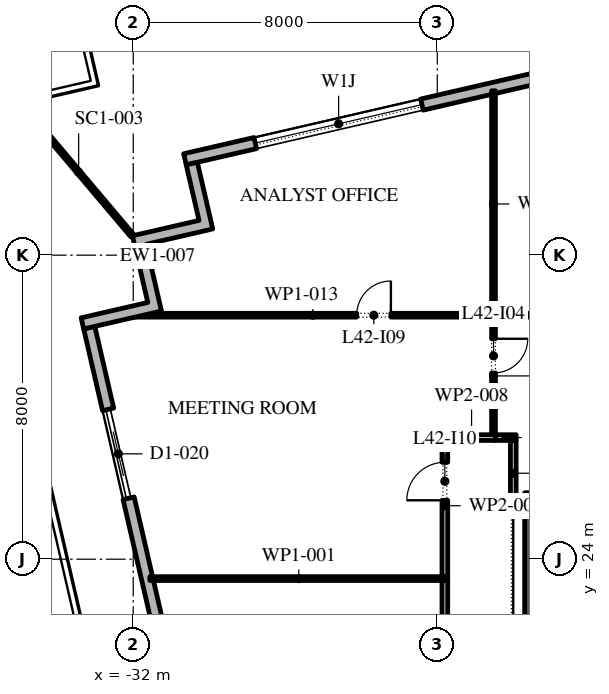
"""IFC4 building model, lengths in metres.
Left out: names, types, materials, properties, quantities, classifications, styles, units other than length and angle.
Written with IfcOpenShell. Run it as: python <this file> out.ifc"""

import sys

from ifc_helpers import new_model, si_unit, direction, frame, frame_2d, origin, place, context, subcontext, project, spatial, polyline, rectangle, outline, extrude, element, fill, save


model = new_model("IFC4")
c1 = context("Model", 3, precision=1e-05, world=origin(), true_north=direction((0.0, 1.0)))
c2 = subcontext(c1, "Body", "Model", "MODEL_VIEW")
j1 = project(units=[si_unit("LENGTHUNIT", "METRE"), si_unit("PLANEANGLEUNIT", "RADIAN")], contexts=[c1])
p1 = place(None, origin())
s1 = spatial("IfcSite", under=j1, at=p1, CompositionType="ELEMENT")
p2 = place(p1, origin())
s2 = spatial("IfcBuilding", under=s1, at=p2, CompositionType="ELEMENT")
p3 = place(p2, frame((0.0, 0.0, 192.6)))
s3 = spatial("IfcBuildingStorey", under=s2, at=p3, CompositionType="ELEMENT", Elevation=192.6)
p4 = place(p3, frame((17.592, 45.657, 0.0), z_axis=(0.0, 0.0, 1.0), x_axis=(-0.974370243697, -0.224950279389, 0.0)))
e1 = element("IfcWall", 1, at=p4, inside=s3, PredefinedType="STANDARD", context=c2, shape_type="SweptSolid", body=[
    extrude(rectangle(XDim=49.5, YDim=0.3, at=frame_2d((24.75, 0.0))), origin(), (0.0, 0.0, 1.0), 4.0),
])
p5 = place(p4, frame((2.8, 0.0, 0.0)))
e2 = element("IfcOpeningElement", 2, at=p5, cuts=e1, PredefinedType="OPENING", context=c2, shape_type="SweptSolid", body=[
    extrude(rectangle(XDim=2.4, YDim=3.5, at=frame_2d((1.2, 1.75))), frame((0.0, 0.16, 0.0), z_axis=(0.0, -1.0, 0.0), x_axis=(1.0, 0.0, 0.0)), (0.0, 0.0, 1.0), 0.32),
])
p6 = place(p4, frame((9.9, 0.0, 0.45)))
e3 = element("IfcOpeningElement", 3, at=p6, cuts=e1, PredefinedType="OPENING", context=c2, shape_type="SweptSolid", body=[
    extrude(rectangle(XDim=4.5, YDim=2.45, at=frame_2d((2.25, 1.225))), frame((0.0, 0.16, 0.0), z_axis=(0.0, -1.0, 0.0), x_axis=(1.0, 0.0, 0.0)), (0.0, 0.0, 1.0), 0.32),
])
p7 = place(p4, frame((18.2, 0.0, 0.45)))
e4 = element("IfcOpeningElement", 4, at=p7, cuts=e1, PredefinedType="OPENING", context=c2, shape_type="SweptSolid", body=[
    extrude(rectangle(XDim=4.5, YDim=2.45, at=frame_2d((2.25, 1.225))), frame((0.0, 0.16, 0.0), z_axis=(0.0, -1.0, 0.0), x_axis=(1.0, 0.0, 0.0)), (0.0, 0.0, 1.0), 0.32),
])
p8 = place(p4, frame((26.5, 0.0, 0.45)))
e5 = element("IfcOpeningElement", 5, at=p8, cuts=e1, PredefinedType="OPENING", context=c2, shape_type="SweptSolid", body=[
    extrude(rectangle(XDim=4.5, YDim=2.525, at=frame_2d((2.25, 1.262))), frame((0.0, 0.16, 0.0), z_axis=(0.0, -1.0, 0.0), x_axis=(1.0, 0.0, 0.0)), (0.0, 0.0, 1.0), 0.32),
])
p9 = place(p4, frame((35.85, 0.0, 0.0)))
e6 = element("IfcOpeningElement", 6, at=p9, cuts=e1, PredefinedType="OPENING", context=c2, shape_type="SweptSolid", body=[
    extrude(rectangle(XDim=2.4, YDim=3.5, at=frame_2d((1.2, 1.75))), frame((0.0, 0.16, 0.0), z_axis=(0.0, -1.0, 0.0), x_axis=(1.0, 0.0, 0.0)), (0.0, 0.0, 1.0), 0.32),
])
p10 = place(p4, frame((43.1, 0.0, 0.45)))
e7 = element("IfcOpeningElement", 7, at=p10, cuts=e1, PredefinedType="OPENING", context=c2, shape_type="SweptSolid", body=[
    extrude(rectangle(XDim=4.5, YDim=2.675, at=frame_2d((2.25, 1.337))), frame((0.0, 0.16, 0.0), z_axis=(0.0, -1.0, 0.0), x_axis=(1.0, 0.0, 0.0)), (0.0, 0.0, 1.0), 0.32),
])
p11 = place(p3, frame((-33.157, 30.092, 0.0), z_axis=(0.0, 0.0, 1.0), x_axis=(0.224950279389, -0.974370243697, 0.0)))
e8 = element("IfcWall", 8, at=p11, inside=s3, PredefinedType="STANDARD", context=c2, shape_type="SweptSolid", body=[
    extrude(rectangle(XDim=49.5, YDim=0.3, at=frame_2d((24.75, 0.0))), origin(), (0.0, 0.0, 1.0), 4.0),
])
p12 = place(p11, frame((2.207, 0.0, 0.0)))
e9 = element("IfcOpeningElement", 9, at=p12, cuts=e8, PredefinedType="OPENING", context=c2, shape_type="SweptSolid", body=[
    extrude(rectangle(XDim=2.4, YDim=3.5, at=frame_2d((1.2, 1.75))), frame((0.0, 0.16, 0.0), z_axis=(0.0, -1.0, 0.0), x_axis=(1.0, 0.0, 0.0)), (0.0, 0.0, 1.0), 0.32),
])
p13 = place(p11, frame((8.121, 0.0, 0.45)))
e10 = element("IfcOpeningElement", 10, at=p13, cuts=e8, PredefinedType="OPENING", context=c2, shape_type="SweptSolid", body=[
    extrude(rectangle(XDim=4.5, YDim=2.825, at=frame_2d((2.25, 1.413))), frame((0.0, 0.16, 0.0), z_axis=(0.0, -1.0, 0.0), x_axis=(1.0, 0.0, 0.0)), (0.0, 0.0, 1.0), 0.32),
])
p14 = place(p11, frame((15.236, 0.0, 0.45)))
e11 = element("IfcOpeningElement", 11, at=p14, cuts=e8, PredefinedType="OPENING", context=c2, shape_type="SweptSolid", body=[
    extrude(rectangle(XDim=4.5, YDim=2.95, at=frame_2d((2.25, 1.475))), frame((0.0, 0.16, 0.0), z_axis=(0.0, -1.0, 0.0), x_axis=(1.0, 0.0, 0.0)), (0.0, 0.0, 1.0), 0.32),
])
p15 = place(p11, frame((22.35, 0.0, 0.45)))
e12 = element("IfcOpeningElement", 12, at=p15, cuts=e8, PredefinedType="OPENING", context=c2, shape_type="SweptSolid", body=[
    extrude(rectangle(XDim=4.5, YDim=3.0, at=frame_2d((2.25, 1.5))), frame((0.0, 0.16, 0.0), z_axis=(0.0, -1.0, 0.0), x_axis=(1.0, 0.0, 0.0)), (0.0, 0.0, 1.0), 0.32),
])
p16 = place(p11, frame((30.514, 0.0, 0.0)))
e13 = element("IfcOpeningElement", 13, at=p16, cuts=e8, PredefinedType="OPENING", context=c2, shape_type="SweptSolid", body=[
    extrude(rectangle(XDim=2.4, YDim=3.5, at=frame_2d((1.2, 1.75))), frame((0.0, 0.16, 0.0), z_axis=(0.0, -1.0, 0.0), x_axis=(1.0, 0.0, 0.0)), (0.0, 0.0, 1.0), 0.32),
])
p17 = place(p11, frame((36.579, 0.0, 0.45)))
e14 = element("IfcOpeningElement", 14, at=p17, cuts=e8, PredefinedType="OPENING", context=c2, shape_type="SweptSolid", body=[
    extrude(rectangle(XDim=4.5, YDim=3.05, at=frame_2d((2.25, 1.525))), frame((0.0, 0.16, 0.0), z_axis=(0.0, -1.0, 0.0), x_axis=(1.0, 0.0, 0.0)), (0.0, 0.0, 1.0), 0.32),
])
p18 = place(p11, frame((43.693, 0.0, 0.45)))
e15 = element("IfcOpeningElement", 15, at=p18, cuts=e8, PredefinedType="OPENING", context=c2, shape_type="SweptSolid", body=[
    extrude(rectangle(XDim=4.5, YDim=3.05, at=frame_2d((2.25, 1.525))), frame((0.0, 0.16, 0.0), z_axis=(0.0, -1.0, 0.0), x_axis=(1.0, 0.0, 0.0)), (0.0, 0.0, 1.0), 0.32),
])
p19 = place(p3, origin())
e16 = element("IfcWall", 16, at=p19, inside=s3, PredefinedType="STANDARD", context=c2, shape_type="SweptSolid", body=[
    extrude(outline(polyline([(-31.617, 30.756), (-32.022, 32.51), (-30.268, 32.914), (-30.605, 34.376), (-30.313, 34.443), (-29.908, 32.69), (-31.662, 32.285), (-31.257, 30.531), (-33.303, 30.058), (-33.371, 30.351), (-31.617, 30.756)])), origin(), (0.0, 0.0, 1.0), 4.0),
])
p20 = place(p3, frame((-32.022, 32.51, -0.05), z_axis=(0.0, 0.0, 1.0), x_axis=(-0.64553496232, 0.763730719837, 0.0)))
e17 = element("IfcWall", 17, at=p20, inside=s3, PredefinedType="STANDARD", context=c2, shape_type="SweptSolid", body=[
    extrude(rectangle(XDim=4.381, YDim=0.1, at=frame_2d((2.19, 0.0))), origin(), (0.0, 0.0, 1.0), 4.05),
])
p21 = place(p3, frame((-21.35, -2.45, 0.0), z_axis=(0.0, 0.0, 1.0), x_axis=(0.0, 1.0, 0.0)))
e18 = element("IfcWall", 18, at=p21, inside=s3, PredefinedType="SHEAR", context=c2, shape_type="SweptSolid", body=[
    extrude(rectangle(XDim=27.9, YDim=0.7, at=frame_2d((13.95, 0.0))), origin(), (0.0, 0.0, 1.0), 4.0),
])
p22 = place(p21, frame((5.05, 0.0, 0.0)))
e19 = element("IfcOpeningElement", 19, at=p22, cuts=e18, PredefinedType="OPENING", context=c2, shape_type="SweptSolid", body=[
    extrude(rectangle(XDim=1.2, YDim=2.1, at=frame_2d((0.6, 1.05))), frame((0.0, 0.36, 0.0), z_axis=(0.0, -1.0, 0.0), x_axis=(1.0, 0.0, 0.0)), (0.0, 0.0, 1.0), 0.72),
])
p23 = place(p21, frame((21.65, 0.0, 0.0)))
e20 = element("IfcOpeningElement", 20, at=p23, cuts=e18, PredefinedType="OPENING", context=c2, shape_type="SweptSolid", body=[
    extrude(rectangle(XDim=1.2, YDim=2.1, at=frame_2d((0.6, 1.05))), frame((0.0, 0.36, 0.0), z_axis=(0.0, -1.0, 0.0), x_axis=(1.0, 0.0, 0.0)), (0.0, 0.0, 1.0), 0.72),
])
p24 = place(p3, frame((-21.7, 25.6, 0.0), z_axis=(0.0, 0.0, 1.0), x_axis=(1.0, 0.0, 0.0)))
e21 = element("IfcWall", 21, at=p24, inside=s3, PredefinedType="SHEAR", context=c2, shape_type="SweptSolid", body=[
    extrude(rectangle(XDim=11.4, YDim=0.3, at=frame_2d((5.7, 0.0))), origin(), (0.0, 0.0, 1.0), 4.0),
])
p25 = place(p3, frame((-31.562, 23.49, 0.0), z_axis=(0.0, 0.0, 1.0), x_axis=(1.0, 0.0, 0.0)))
e22 = element("IfcWall", 22, at=p25, inside=s3, PredefinedType="PARTITIONING", context=c2, shape_type="SweptSolid", body=[
    extrude(rectangle(XDim=7.837, YDim=0.1, at=frame_2d((3.918, 0.0))), origin(), (0.0, 0.0, 1.0), 4.0),
])
p26 = place(p3, frame((-23.8, 16.6, 0.0), z_axis=(0.0, 0.0, 1.0), x_axis=(0.0, 1.0, 0.0)))
e23 = element("IfcWall", 23, at=p26, inside=s3, PredefinedType="PARTITIONING", context=c2, shape_type="SweptSolid", body=[
    extrude(rectangle(XDim=6.84, YDim=0.15, at=frame_2d((3.42, 0.0))), origin(), (0.0, 0.0, 1.0), 4.0),
])
p27 = place(p26, frame((3.49, 0.0, 0.0)))
e24 = element("IfcOpeningElement", 24, at=p27, cuts=e23, PredefinedType="OPENING", context=c2, shape_type="SweptSolid", body=[
    extrude(rectangle(XDim=1.0, YDim=2.1, at=frame_2d((0.5, 1.05))), frame((0.0, 0.085, 0.0), z_axis=(0.0, -1.0, 0.0), x_axis=(1.0, 0.0, 0.0)), (0.0, 0.0, 1.0), 0.17),
])
p28 = place(p3, frame((-23.8, 23.54, 0.0), z_axis=(0.0, 0.0, 1.0), x_axis=(0.0, 1.0, 0.0)))
e25 = element("IfcWall", 25, at=p28, inside=s3, PredefinedType="PARTITIONING", context=c2, shape_type="SweptSolid", body=[
    extrude(rectangle(XDim=3.735, YDim=0.15, at=frame_2d((1.867, 0.0))), origin(), (0.0, 0.0, 1.0), 4.0),
])
p29 = place(p28, frame((2.01, 0.0, 0.0)))
e26 = element("IfcOpeningElement", 26, at=p29, cuts=e25, PredefinedType="OPENING", context=c2, shape_type="SweptSolid", body=[
    extrude(rectangle(XDim=1.0, YDim=2.1, at=frame_2d((0.5, 1.05))), frame((0.0, 0.085, 0.0), z_axis=(0.0, -1.0, 0.0), x_axis=(1.0, 0.0, 0.0)), (0.0, 0.0, 1.0), 0.17),
])
p30 = place(p3, frame((-23.725, 27.2, 0.0), z_axis=(0.0, 0.0, 1.0), x_axis=(1.0, 0.0, 0.0)))
e27 = element("IfcWall", 27, at=p30, inside=s3, PredefinedType="PARTITIONING", context=c2, shape_type="SweptSolid", body=[
    extrude(rectangle(XDim=1.255, YDim=0.15, at=frame_2d((0.627, 0.0))), origin(), (0.0, 0.0, 1.0), 4.0),
])
p31 = place(p3, frame((-22.52, 27.275, 0.0), z_axis=(0.0, 0.0, 1.0), x_axis=(0.0, 1.0, 0.0)))
e28 = element("IfcWall", 28, at=p31, inside=s3, PredefinedType="PARTITIONING", context=c2, shape_type="SweptSolid", body=[
    extrude(rectangle(XDim=3.095, YDim=0.1, at=frame_2d((1.548, 0.0))), origin(), (0.0, 0.0, 1.0), 4.0),
])
p32 = place(p31, frame((1.625, 0.0, 0.0)))
e29 = element("IfcOpeningElement", 29, at=p32, cuts=e28, PredefinedType="OPENING", context=c2, shape_type="SweptSolid", body=[
    extrude(rectangle(XDim=0.9, YDim=2.1, at=frame_2d((0.45, 1.05))), frame((0.0, 0.06, 0.0), z_axis=(0.0, -1.0, 0.0), x_axis=(1.0, 0.0, 0.0)), (0.0, 0.0, 1.0), 0.12),
])
p33 = place(p3, frame((-22.47, 27.2, 0.0), z_axis=(0.0, 0.0, 1.0), x_axis=(1.0, 0.0, 0.0)))
e30 = element("IfcWall", 30, at=p33, inside=s3, PredefinedType="PARTITIONING", context=c2, shape_type="SweptSolid", body=[
    extrude(rectangle(XDim=0.545, YDim=0.15, at=frame_2d((0.272, 0.0))), origin(), (0.0, 0.0, 1.0), 4.0),
])
p34 = place(p3, frame((-22.57, 30.42, 0.0), z_axis=(0.0, 0.0, 1.0), x_axis=(-1.0, 0.0, 0.0)))
e31 = element("IfcWall", 31, at=p34, inside=s3, PredefinedType="PARTITIONING", context=c2, shape_type="SweptSolid", body=[
    extrude(rectangle(XDim=9.412, YDim=0.1, at=frame_2d((4.706, 0.0))), origin(), (0.0, 0.0, 1.0), 4.0),
])
p35 = place(p34, frame((2.65, 0.0, 0.0)))
e32 = element("IfcOpeningElement", 32, at=p35, cuts=e31, PredefinedType="OPENING", context=c2, shape_type="SweptSolid", body=[
    extrude(rectangle(XDim=0.9, YDim=2.1, at=frame_2d((0.45, 1.05))), frame((0.0, 0.06, 0.0), z_axis=(0.0, -1.0, 0.0), x_axis=(1.0, 0.0, 0.0)), (0.0, 0.0, 1.0), 0.12),
])
p36 = place(p3, frame((-22.52, 30.37, 0.0), z_axis=(0.0, 0.0, 1.0), x_axis=(0.0, 1.0, 0.0)))
e33 = element("IfcWall", 33, at=p36, inside=s3, PredefinedType="PARTITIONING", context=c2, shape_type="SweptSolid", body=[
    extrude(rectangle(XDim=5.955, YDim=0.1, at=frame_2d((2.978, 0.0))), origin(), (0.0, 0.0, 1.0), 4.0),
])
p37 = place(p3, frame((-22.47, 30.42, 0.0), z_axis=(0.0, 0.0, 1.0), x_axis=(1.0, 0.0, 0.0)))
e34 = element("IfcWall", 34, at=p37, inside=s3, PredefinedType="PARTITIONING", context=c2, shape_type="SweptSolid", body=[
    extrude(rectangle(XDim=9.02, YDim=0.1, at=frame_2d((4.51, 0.0))), origin(), (0.0, 0.0, 1.0), 4.0),
])
p38 = place(p3, frame((-22.0, 27.125, 0.0), z_axis=(0.0, 0.0, 1.0), x_axis=(0.0, -1.0, 0.0)))
e35 = element("IfcWall", 35, at=p38, inside=s3, PredefinedType="PARTITIONING", context=c2, shape_type="SweptSolid", body=[
    extrude(rectangle(XDim=1.725, YDim=0.15, at=frame_2d((0.863, 0.0))), origin(), (0.0, 0.0, 1.0), 4.0),
])
p39 = place(p10, origin())
e36 = element("IfcWindow", 36, at=p39, inside=s3, PartitioningType="DOUBLE_PANEL_VERTICAL", PredefinedType="WINDOW", context=c2, shape_type="SweptSolid", body=[
    extrude(rectangle(XDim=4.5, YDim=2.675, at=frame_2d((2.25, 1.337))), frame((0.0, 0.03, 0.0), z_axis=(0.0, -1.0, 0.0), x_axis=(1.0, 0.0, 0.0)), (0.0, 0.0, 1.0), 0.06),
])
fill(e7, e36)
p40 = place(p12, origin())
e37 = element("IfcDoor", 37, at=p40, inside=s3, OperationType="DOUBLE_DOOR_SLIDING", PredefinedType="DOOR", context=c2, shape_type="SweptSolid", body=[
    extrude(rectangle(XDim=2.4, YDim=3.5, at=frame_2d((1.2, 1.75))), frame((0.0, 0.025, 0.0), z_axis=(0.0, -1.0, 0.0), x_axis=(1.0, 0.0, 0.0)), (0.0, 0.0, 1.0), 0.05),
])
fill(e9, e37)
p41 = place(p32, frame((0.9, 0.0, 0.0), z_axis=(0.0, 0.0, 1.0), x_axis=(-1.0, 0.0, 0.0)))
e38 = element("IfcDoor", 38, at=p41, inside=s3, OperationType="SINGLE_SWING_RIGHT", PredefinedType="DOOR", context=c2, shape_type="SweptSolid", body=[
    extrude(rectangle(XDim=0.9, YDim=2.1, at=frame_2d((0.45, 1.05))), frame((0.0, 0.025, 0.0), z_axis=(0.0, -1.0, 0.0), x_axis=(1.0, 0.0, 0.0)), (0.0, 0.0, 1.0), 0.05),
])
fill(e29, e38)
p42 = place(p35, frame((0.9, 0.0, 0.0), z_axis=(0.0, 0.0, 1.0), x_axis=(-1.0, 0.0, 0.0)))
e39 = element("IfcDoor", 39, at=p42, inside=s3, OperationType="SINGLE_SWING_LEFT", PredefinedType="DOOR", context=c2, shape_type="SweptSolid", body=[
    extrude(rectangle(XDim=0.9, YDim=2.1, at=frame_2d((0.45, 1.05))), frame((0.0, 0.025, 0.0), z_axis=(0.0, -1.0, 0.0), x_axis=(1.0, 0.0, 0.0)), (0.0, 0.0, 1.0), 0.05),
])
fill(e32, e39)
p43 = place(p29, origin())
e40 = element("IfcDoor", 40, at=p43, inside=s3, OperationType="SINGLE_SWING_RIGHT", PredefinedType="DOOR", context=c2, shape_type="SweptSolid", body=[
    extrude(rectangle(XDim=1.0, YDim=2.1, at=frame_2d((0.5, 1.05))), frame((0.0, 0.025, 0.0), z_axis=(0.0, -1.0, 0.0), x_axis=(1.0, 0.0, 0.0)), (0.0, 0.0, 1.0), 0.05),
])
fill(e26, e40)
save(model, sys.argv[1])
